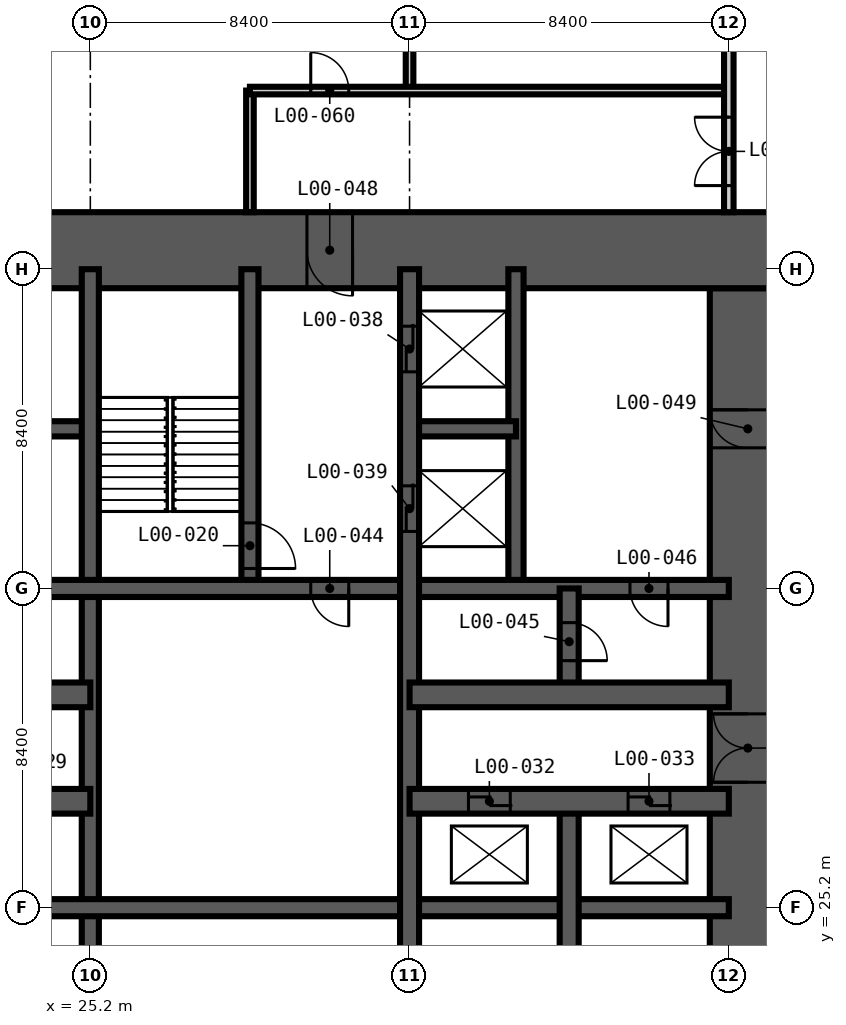
"""IFC4 building model, lengths in metres.
Left out: names, types, materials, properties, quantities, classifications, styles, units other than length and angle.
Written with IfcOpenShell. Run it as: python <this file> out.ifc"""

import sys

from ifc_helpers import new_model, si_unit, direction, frame, frame_2d, origin, place, context, subcontext, project, spatial, rectangle, extrude, element, fill, save


model = new_model("IFC4")
c1 = context("Model", 3, precision=1e-05, world=origin(), true_north=direction((0.0, 1.0)))
c2 = subcontext(c1, "Body", "Model", "MODEL_VIEW")
j1 = project(units=[si_unit("LENGTHUNIT", "METRE"), si_unit("PLANEANGLEUNIT", "RADIAN")], contexts=[c1])
p1 = place(None, origin())
s1 = spatial("IfcSite", under=j1, at=p1, CompositionType="ELEMENT")
p2 = place(p1, origin())
s2 = spatial("IfcBuilding", under=s1, at=p2, CompositionType="ELEMENT")
p3 = place(p2, origin())
s3 = spatial("IfcBuildingStorey", under=s2, at=p3, CompositionType="ELEMENT", Elevation=0.0)
p4 = place(p3, frame((42.5, 17.3, -0.3), z_axis=(0.0, 0.0, 1.0), x_axis=(0.0, 1.0, 0.0)))
e1 = element("IfcWall", 1, at=p4, inside=s3, PredefinedType="SHEAR", context=c2, shape_type="SweptSolid", body=[
    extrude(rectangle(XDim=24.2, YDim=2.0, at=frame_2d((12.1, 0.0))), origin(), (0.0, 0.0, 1.0), 6.0),
])
p5 = place(p4, frame((0.3, 0.0, 0.3)))
e2 = element("IfcOpeningElement", 2, at=p5, cuts=e1, PredefinedType="OPENING", context=c2, shape_type="SweptSolid", body=[
    extrude(rectangle(XDim=1.2, YDim=2.2, at=frame_2d((0.6, 1.1))), frame((0.0, 1.01, 0.0), z_axis=(0.0, -1.0, 0.0), x_axis=(1.0, 0.0, 0.0)), (0.0, 0.0, 1.0), 2.02),
])
p6 = place(p4, frame((11.2, 0.0, 0.3)))
e3 = element("IfcOpeningElement", 3, at=p6, cuts=e1, PredefinedType="OPENING", context=c2, shape_type="SweptSolid", body=[
    extrude(rectangle(XDim=1.8, YDim=2.2, at=frame_2d((0.9, 1.1))), frame((0.0, 1.01, 0.0), z_axis=(0.0, -1.0, 0.0), x_axis=(1.0, 0.0, 0.0)), (0.0, 0.0, 1.0), 2.02),
])
p7 = place(p4, frame((20.0, 0.0, 0.3)))
e4 = element("IfcOpeningElement", 4, at=p7, cuts=e1, PredefinedType="OPENING", context=c2, shape_type="SweptSolid", body=[
    extrude(rectangle(XDim=1.0, YDim=2.1, at=frame_2d((0.5, 1.05))), frame((0.0, 1.01, 0.0), z_axis=(0.0, -1.0, 0.0), x_axis=(1.0, 0.0, 0.0)), (0.0, 0.0, 1.0), 2.02),
])
p8 = place(p3, frame((43.5, 42.5, -0.3), z_axis=(0.0, 0.0, 1.0), x_axis=(-1.0, 0.0, 0.0)))
e5 = element("IfcWall", 5, at=p8, inside=s3, PredefinedType="SHEAR", context=c2, shape_type="SweptSolid", body=[
    extrude(rectangle(XDim=28.2, YDim=2.0, at=frame_2d((14.1, 0.0))), origin(), (0.0, 0.0, 1.0), 6.0),
])
p9 = place(p8, frame((22.0, 0.0, 0.3)))
e6 = element("IfcOpeningElement", 6, at=p9, cuts=e5, PredefinedType="OPENING", context=c2, shape_type="SweptSolid", body=[
    extrude(rectangle(XDim=1.0, YDim=2.1, at=frame_2d((0.5, 1.05))), frame((0.0, 1.01, 0.0), z_axis=(0.0, -1.0, 0.0), x_axis=(1.0, 0.0, 0.0)), (0.0, 0.0, 1.0), 2.02),
])
p10 = place(p8, frame((11.4, 0.0, 0.3)))
e7 = element("IfcOpeningElement", 7, at=p10, cuts=e5, PredefinedType="OPENING", context=c2, shape_type="SweptSolid", body=[
    extrude(rectangle(XDim=1.2, YDim=2.2, at=frame_2d((0.6, 1.1))), frame((0.0, 1.01, 0.0), z_axis=(0.0, -1.0, 0.0), x_axis=(1.0, 0.0, 0.0)), (0.0, 0.0, 1.0), 2.02),
])
for number, where, z_axis, x_axis in (
    (8, (36.4, 33.6, -0.3), (0.0, 0.0, 1.0), (0.0, 1.0, 0.0)),
    (9, (16.8, 37.8, -0.3), (0.0, 0.0, 1.0), (1.0, 0.0, 0.0)),
):
    element("IfcWall", number, at=place(p3, frame(where, z_axis=z_axis, x_axis=x_axis)), inside=s3, PredefinedType="SHEAR", context=c2, shape_type="SweptSolid", body=[
        extrude(rectangle(XDim=8.4, YDim=0.4, at=frame_2d((4.2, 0.0))), origin(), (0.0, 0.0, 1.0), 6.0),
    ])
p11 = place(p3, frame((33.6, 37.8, -0.3), z_axis=(0.0, 0.0, 1.0), x_axis=(1.0, 0.0, 0.0)))
e10 = element("IfcWall", 10, at=p11, inside=s3, PredefinedType="SHEAR", context=c2, shape_type="SweptSolid", body=[
    extrude(rectangle(XDim=2.8, YDim=0.4, at=frame_2d((1.4, 0.0))), origin(), (0.0, 0.0, 1.0), 6.0),
])
p12 = place(p3, frame((25.2, 16.8, -0.3), z_axis=(0.0, 0.0, 1.0), x_axis=(0.0, 1.0, 0.0)))
e11 = element("IfcWall", 11, at=p12, inside=s3, PredefinedType="SHEAR", context=c2, shape_type="SweptSolid", body=[
    extrude(rectangle(XDim=25.2, YDim=0.45, at=frame_2d((12.6, 0.0))), origin(), (0.0, 0.0, 1.0), 6.0),
])
p13 = place(p3, frame((29.4, 33.6, -0.3), z_axis=(0.0, 0.0, 1.0), x_axis=(0.0, 1.0, 0.0)))
e12 = element("IfcWall", 12, at=p13, inside=s3, PredefinedType="SHEAR", context=c2, shape_type="SweptSolid", body=[
    extrude(rectangle(XDim=8.4, YDim=0.45, at=frame_2d((4.2, 0.0))), origin(), (0.0, 0.0, 1.0), 6.0),
])
p14 = place(p13, frame((0.525, 0.0, 0.3)))
e13 = element("IfcOpeningElement", 13, at=p14, cuts=e12, PredefinedType="OPENING", context=c2, shape_type="SweptSolid", body=[
    extrude(rectangle(XDim=1.2, YDim=2.2, at=frame_2d((0.6, 1.1))), frame((0.0, 0.235, 0.0), z_axis=(0.0, -1.0, 0.0), x_axis=(1.0, 0.0, 0.0)), (0.0, 0.0, 1.0), 0.47),
])
p15 = place(p3, frame((16.8, 25.2, -0.3), z_axis=(0.0, 0.0, 1.0), x_axis=(1.0, 0.0, 0.0)))
e14 = element("IfcWall", 14, at=p15, inside=s3, PredefinedType="SHEAR", context=c2, shape_type="SweptSolid", body=[
    extrude(rectangle(XDim=25.2, YDim=0.45, at=frame_2d((12.6, 0.0))), origin(), (0.0, 0.0, 1.0), 6.0),
])
p16 = place(p3, frame((16.8, 33.6, -0.3), z_axis=(0.0, 0.0, 1.0), x_axis=(1.0, 0.0, 0.0)))
e15 = element("IfcWall", 15, at=p16, inside=s3, PredefinedType="SHEAR", context=c2, shape_type="SweptSolid", body=[
    extrude(rectangle(XDim=25.2, YDim=0.45, at=frame_2d((12.6, 0.0))), origin(), (0.0, 0.0, 1.0), 6.0),
])
p17 = place(p16, frame((14.2, 0.0, 0.3)))
e16 = element("IfcOpeningElement", 16, at=p17, cuts=e15, PredefinedType="OPENING", context=c2, shape_type="SweptSolid", body=[
    extrude(rectangle(XDim=1.0, YDim=2.1, at=frame_2d((0.5, 1.05))), frame((0.0, 0.235, 0.0), z_axis=(0.0, -1.0, 0.0), x_axis=(1.0, 0.0, 0.0)), (0.0, 0.0, 1.0), 0.47),
])
p18 = place(p16, frame((22.6, 0.0, 0.3)))
e17 = element("IfcOpeningElement", 17, at=p18, cuts=e15, PredefinedType="OPENING", context=c2, shape_type="SweptSolid", body=[
    extrude(rectangle(XDim=1.0, YDim=2.1, at=frame_2d((0.5, 1.05))), frame((0.0, 0.235, 0.0), z_axis=(0.0, -1.0, 0.0), x_axis=(1.0, 0.0, 0.0)), (0.0, 0.0, 1.0), 0.47),
])
p19 = place(p3, frame((33.6, 16.8, -0.3), z_axis=(0.0, 0.0, 1.0), x_axis=(0.0, 1.0, 0.0)))
e18 = element("IfcWall", 18, at=p19, inside=s3, PredefinedType="SHEAR", context=c2, shape_type="SweptSolid", body=[
    extrude(rectangle(XDim=25.2, YDim=0.5, at=frame_2d((12.6, 0.0))), origin(), (0.0, 0.0, 1.0), 6.0),
])
p20 = place(p19, frame((22.5, 0.0, 0.3)))
e19 = element("IfcOpeningElement", 19, at=p20, cuts=e18, PredefinedType="OPENING", context=c2, shape_type="SweptSolid", body=[
    extrude(rectangle(XDim=1.2, YDim=2.2, at=frame_2d((0.6, 1.1))), frame((0.0, 0.26, 0.0), z_axis=(0.0, -1.0, 0.0), x_axis=(1.0, 0.0, 0.0)), (0.0, 0.0, 1.0), 0.52),
])
p21 = place(p19, frame((18.3, 0.0, 0.3)))
e20 = element("IfcOpeningElement", 20, at=p21, cuts=e18, PredefinedType="OPENING", context=c2, shape_type="SweptSolid", body=[
    extrude(rectangle(XDim=1.2, YDim=2.2, at=frame_2d((0.6, 1.1))), frame((0.0, 0.26, 0.0), z_axis=(0.0, -1.0, 0.0), x_axis=(1.0, 0.0, 0.0)), (0.0, 0.0, 1.0), 0.52),
])
p22 = place(p3, frame((37.8, 16.8, -0.3), z_axis=(0.0, 0.0, 1.0), x_axis=(0.0, 1.0, 0.0)))
e21 = element("IfcWall", 21, at=p22, inside=s3, PredefinedType="SHEAR", context=c2, shape_type="SweptSolid", body=[
    extrude(rectangle(XDim=11.2, YDim=0.5, at=frame_2d((5.6, 0.0))), origin(), (0.0, 0.0, 1.0), 6.0),
])
p23 = place(p3, frame((37.8, 30.8, -0.3), z_axis=(0.0, 0.0, 1.0), x_axis=(0.0, 1.0, 0.0)))
e22 = element("IfcWall", 22, at=p23, inside=s3, PredefinedType="SHEAR", context=c2, shape_type="SweptSolid", body=[
    extrude(rectangle(XDim=2.8, YDim=0.5, at=frame_2d((1.4, 0.0))), origin(), (0.0, 0.0, 1.0), 6.0),
])
p24 = place(p23, frame((0.9, 0.0, 0.3)))
e23 = element("IfcOpeningElement", 23, at=p24, cuts=e22, PredefinedType="OPENING", context=c2, shape_type="SweptSolid", body=[
    extrude(rectangle(XDim=1.0, YDim=2.1, at=frame_2d((0.5, 1.05))), frame((0.0, 0.26, 0.0), z_axis=(0.0, -1.0, 0.0), x_axis=(1.0, 0.0, 0.0)), (0.0, 0.0, 1.0), 0.52),
])
p25 = place(p3, frame((16.8, 28.0, -0.3), z_axis=(0.0, 0.0, 1.0), x_axis=(1.0, 0.0, 0.0)))
e24 = element("IfcWall", 24, at=p25, inside=s3, PredefinedType="SHEAR", context=c2, shape_type="SweptSolid", body=[
    extrude(rectangle(XDim=8.4, YDim=0.65, at=frame_2d((4.2, 0.0))), origin(), (0.0, 0.0, 1.0), 6.0),
])
p26 = place(p25, frame((1.55, 0.0, 0.3)))
e25 = element("IfcOpeningElement", 25, at=p26, cuts=e24, PredefinedType="OPENING", context=c2, shape_type="SweptSolid", body=[
    extrude(rectangle(XDim=1.1, YDim=2.2, at=frame_2d((0.55, 1.1))), frame((0.0, 0.335, 0.0), z_axis=(0.0, -1.0, 0.0), x_axis=(1.0, 0.0, 0.0)), (0.0, 0.0, 1.0), 0.67),
])
p27 = place(p25, frame((5.75, 0.0, 0.3)))
e26 = element("IfcOpeningElement", 26, at=p27, cuts=e24, PredefinedType="OPENING", context=c2, shape_type="SweptSolid", body=[
    extrude(rectangle(XDim=1.1, YDim=2.2, at=frame_2d((0.55, 1.1))), frame((0.0, 0.335, 0.0), z_axis=(0.0, -1.0, 0.0), x_axis=(1.0, 0.0, 0.0)), (0.0, 0.0, 1.0), 0.67),
])
p28 = place(p3, frame((33.6, 28.0, -0.3), z_axis=(0.0, 0.0, 1.0), x_axis=(1.0, 0.0, 0.0)))
e27 = element("IfcWall", 27, at=p28, inside=s3, PredefinedType="SHEAR", context=c2, shape_type="SweptSolid", body=[
    extrude(rectangle(XDim=8.4, YDim=0.65, at=frame_2d((4.2, 0.0))), origin(), (0.0, 0.0, 1.0), 6.0),
])
p29 = place(p28, frame((1.55, 0.0, 0.3)))
e28 = element("IfcOpeningElement", 28, at=p29, cuts=e27, PredefinedType="OPENING", context=c2, shape_type="SweptSolid", body=[
    extrude(rectangle(XDim=1.1, YDim=2.2, at=frame_2d((0.55, 1.1))), frame((0.0, 0.335, 0.0), z_axis=(0.0, -1.0, 0.0), x_axis=(1.0, 0.0, 0.0)), (0.0, 0.0, 1.0), 0.67),
])
p30 = place(p28, frame((5.75, 0.0, 0.3)))
e29 = element("IfcOpeningElement", 29, at=p30, cuts=e27, PredefinedType="OPENING", context=c2, shape_type="SweptSolid", body=[
    extrude(rectangle(XDim=1.1, YDim=2.2, at=frame_2d((0.55, 1.1))), frame((0.0, 0.335, 0.0), z_axis=(0.0, -1.0, 0.0), x_axis=(1.0, 0.0, 0.0)), (0.0, 0.0, 1.0), 0.67),
])
p31 = place(p3, frame((16.8, 30.8, -0.3), z_axis=(0.0, 0.0, 1.0), x_axis=(1.0, 0.0, 0.0)))
e30 = element("IfcWall", 30, at=p31, inside=s3, PredefinedType="SHEAR", context=c2, shape_type="SweptSolid", body=[
    extrude(rectangle(XDim=8.4, YDim=0.65, at=frame_2d((4.2, 0.0))), origin(), (0.0, 0.0, 1.0), 6.0),
])
p32 = place(p31, frame((1.55, 0.0, 0.3)))
e31 = element("IfcOpeningElement", 31, at=p32, cuts=e30, PredefinedType="OPENING", context=c2, shape_type="SweptSolid", body=[
    extrude(rectangle(XDim=1.1, YDim=2.2, at=frame_2d((0.55, 1.1))), frame((0.0, 0.335, 0.0), z_axis=(0.0, -1.0, 0.0), x_axis=(1.0, 0.0, 0.0)), (0.0, 0.0, 1.0), 0.67),
])
p33 = place(p31, frame((5.75, 0.0, 0.3)))
e32 = element("IfcOpeningElement", 32, at=p33, cuts=e30, PredefinedType="OPENING", context=c2, shape_type="SweptSolid", body=[
    extrude(rectangle(XDim=1.1, YDim=2.2, at=frame_2d((0.55, 1.1))), frame((0.0, 0.335, 0.0), z_axis=(0.0, -1.0, 0.0), x_axis=(1.0, 0.0, 0.0)), (0.0, 0.0, 1.0), 0.67),
])
p34 = place(p3, frame((33.6, 30.8, -0.3), z_axis=(0.0, 0.0, 1.0), x_axis=(1.0, 0.0, 0.0)))
e33 = element("IfcWall", 33, at=p34, inside=s3, PredefinedType="SHEAR", context=c2, shape_type="SweptSolid", body=[
    extrude(rectangle(XDim=8.4, YDim=0.65, at=frame_2d((4.2, 0.0))), origin(), (0.0, 0.0, 1.0), 6.0),
])
p35 = place(p3, frame((29.4, 43.5, 0.0), z_axis=(0.0, 0.0, 1.0), x_axis=(0.0, 1.0, 0.0)))
e34 = element("IfcWall", 34, at=p35, inside=s3, PredefinedType="PARTITIONING", context=c2, shape_type="SweptSolid", body=[
    extrude(rectangle(XDim=3.2, YDim=0.2, at=frame_2d((1.6, 0.0))), origin(), (0.0, 0.0, 1.0), 5.7),
])
p36 = place(p3, frame((33.6, 46.7, 0.0), z_axis=(0.0, 0.0, 1.0), x_axis=(0.0, 1.0, 0.0)))
e35 = element("IfcWall", 35, at=p36, inside=s3, PredefinedType="PARTITIONING", context=c2, shape_type="SweptSolid", body=[
    extrude(rectangle(XDim=12.1, YDim=0.2, at=frame_2d((6.05, 0.0))), origin(), (0.0, 0.0, 1.0), 5.7),
])
p37 = place(p3, frame((29.4, 46.7, 0.0), z_axis=(0.0, 0.0, 1.0), x_axis=(1.0, 0.0, 0.0)))
e36 = element("IfcWall", 36, at=p37, inside=s3, PredefinedType="PARTITIONING", context=c2, shape_type="SweptSolid", body=[
    extrude(rectangle(XDim=12.6, YDim=0.2, at=frame_2d((6.3, 0.0))), origin(), (0.0, 0.0, 1.0), 5.7),
])
p38 = place(p37, frame((1.6, 0.0, 0.0)))
e37 = element("IfcOpeningElement", 37, at=p38, cuts=e36, PredefinedType="OPENING", context=c2, shape_type="SweptSolid", body=[
    extrude(rectangle(XDim=1.0, YDim=2.1, at=frame_2d((0.5, 1.05))), frame((0.0, 0.11, 0.0), z_axis=(0.0, -1.0, 0.0), x_axis=(1.0, 0.0, 0.0)), (0.0, 0.0, 1.0), 0.22),
])
p39 = place(p3, frame((42.0, 43.5, 0.0), z_axis=(0.0, 0.0, 1.0), x_axis=(0.0, 1.0, 0.0)))
e38 = element("IfcWall", 38, at=p39, inside=s3, PredefinedType="PARTITIONING", context=c2, shape_type="SweptSolid", body=[
    extrude(rectangle(XDim=15.3, YDim=0.25, at=frame_2d((7.65, 0.0))), origin(), (0.0, 0.0, 1.0), 5.7),
])
p40 = place(p39, frame((0.7, 0.0, 0.0)))
e39 = element("IfcOpeningElement", 39, at=p40, cuts=e38, PredefinedType="OPENING", context=c2, shape_type="SweptSolid", body=[
    extrude(rectangle(XDim=1.8, YDim=2.4, at=frame_2d((0.9, 1.2))), frame((0.0, 0.135, 0.0), z_axis=(0.0, -1.0, 0.0), x_axis=(1.0, 0.0, 0.0)), (0.0, 0.0, 1.0), 0.27),
])
p41 = place(p39, frame((8.35, 0.0, 0.0)))
e40 = element("IfcOpeningElement", 40, at=p41, cuts=e38, PredefinedType="OPENING", context=c2, shape_type="SweptSolid", body=[
    extrude(rectangle(XDim=1.0, YDim=2.1, at=frame_2d((0.5, 1.05))), frame((0.0, 0.135, 0.0), z_axis=(0.0, -1.0, 0.0), x_axis=(1.0, 0.0, 0.0)), (0.0, 0.0, 1.0), 0.27),
])
p42 = place(p14, frame((1.2, 0.0, 0.0), z_axis=(0.0, 0.0, 1.0), x_axis=(-1.0, 0.0, 0.0)))
e41 = element("IfcDoor", 41, at=p42, inside=s3, OperationType="SINGLE_SWING_RIGHT", PredefinedType="DOOR", context=c2, shape_type="SweptSolid", body=[
    extrude(rectangle(XDim=1.2, YDim=2.2, at=frame_2d((0.6, 1.1))), frame((0.0, 0.025, 0.0), z_axis=(0.0, -1.0, 0.0), x_axis=(1.0, 0.0, 0.0)), (0.0, 0.0, 1.0), 0.05),
])
fill(e13, e41)
p43 = place(p29, origin())
e42 = element("IfcDoor", 42, at=p43, inside=s3, OperationType="DOUBLE_DOOR_SLIDING", PredefinedType="DOOR", context=c2, shape_type="SweptSolid", body=[
    extrude(rectangle(XDim=1.1, YDim=2.2, at=frame_2d((0.55, 1.1))), frame((0.0, 0.025, 0.0), z_axis=(0.0, -1.0, 0.0), x_axis=(1.0, 0.0, 0.0)), (0.0, 0.0, 1.0), 0.05),
])
fill(e28, e42)
p44 = place(p30, origin())
e43 = element("IfcDoor", 43, at=p44, inside=s3, OperationType="DOUBLE_DOOR_SLIDING", PredefinedType="DOOR", context=c2, shape_type="SweptSolid", body=[
    extrude(rectangle(XDim=1.1, YDim=2.2, at=frame_2d((0.55, 1.1))), frame((0.0, 0.025, 0.0), z_axis=(0.0, -1.0, 0.0), x_axis=(1.0, 0.0, 0.0)), (0.0, 0.0, 1.0), 0.05),
])
fill(e29, e43)
p45 = place(p20, origin())
e44 = element("IfcDoor", 44, at=p45, inside=s3, OperationType="DOUBLE_DOOR_SLIDING", PredefinedType="DOOR", context=c2, shape_type="SweptSolid", body=[
    extrude(rectangle(XDim=1.2, YDim=2.2, at=frame_2d((0.6, 1.1))), frame((0.0, 0.025, 0.0), z_axis=(0.0, -1.0, 0.0), x_axis=(1.0, 0.0, 0.0)), (0.0, 0.0, 1.0), 0.05),
])
fill(e19, e44)
p46 = place(p21, origin())
e45 = element("IfcDoor", 45, at=p46, inside=s3, OperationType="DOUBLE_DOOR_SLIDING", PredefinedType="DOOR", context=c2, shape_type="SweptSolid", body=[
    extrude(rectangle(XDim=1.2, YDim=2.2, at=frame_2d((0.6, 1.1))), frame((0.0, 0.025, 0.0), z_axis=(0.0, -1.0, 0.0), x_axis=(1.0, 0.0, 0.0)), (0.0, 0.0, 1.0), 0.05),
])
fill(e20, e45)
p47 = place(p17, frame((1.0, 0.0, 0.0), z_axis=(0.0, 0.0, 1.0), x_axis=(-1.0, 0.0, 0.0)))
e46 = element("IfcDoor", 46, at=p47, inside=s3, OperationType="SINGLE_SWING_LEFT", PredefinedType="DOOR", context=c2, shape_type="SweptSolid", body=[
    extrude(rectangle(XDim=1.0, YDim=2.1, at=frame_2d((0.5, 1.05))), frame((0.0, 0.025, 0.0), z_axis=(0.0, -1.0, 0.0), x_axis=(1.0, 0.0, 0.0)), (0.0, 0.0, 1.0), 0.05),
])
fill(e16, e46)
p48 = place(p24, frame((1.0, 0.0, 0.0), z_axis=(0.0, 0.0, 1.0), x_axis=(-1.0, 0.0, 0.0)))
e47 = element("IfcDoor", 47, at=p48, inside=s3, OperationType="SINGLE_SWING_RIGHT", PredefinedType="DOOR", context=c2, shape_type="SweptSolid", body=[
    extrude(rectangle(XDim=1.0, YDim=2.1, at=frame_2d((0.5, 1.05))), frame((0.0, 0.025, 0.0), z_axis=(0.0, -1.0, 0.0), x_axis=(1.0, 0.0, 0.0)), (0.0, 0.0, 1.0), 0.05),
])
fill(e23, e47)
p49 = place(p18, frame((1.0, 0.0, 0.0), z_axis=(0.0, 0.0, 1.0), x_axis=(-1.0, 0.0, 0.0)))
e48 = element("IfcDoor", 48, at=p49, inside=s3, OperationType="SINGLE_SWING_LEFT", PredefinedType="DOOR", context=c2, shape_type="SweptSolid", body=[
    extrude(rectangle(XDim=1.0, YDim=2.1, at=frame_2d((0.5, 1.05))), frame((0.0, 0.025, 0.0), z_axis=(0.0, -1.0, 0.0), x_axis=(1.0, 0.0, 0.0)), (0.0, 0.0, 1.0), 0.05),
])
fill(e17, e48)
p50 = place(p6, origin())
e49 = element("IfcDoor", 49, at=p50, inside=s3, OperationType="DOUBLE_DOOR_DOUBLE_SWING", PredefinedType="DOOR", context=c2, shape_type="SweptSolid", body=[
    extrude(rectangle(XDim=1.8, YDim=2.2, at=frame_2d((0.9, 1.1))), frame((0.0, 0.025, 0.0), z_axis=(0.0, -1.0, 0.0), x_axis=(1.0, 0.0, 0.0)), (0.0, 0.0, 1.0), 0.05),
])
fill(e3, e49)
p51 = place(p10, origin())
e50 = element("IfcDoor", 50, at=p51, inside=s3, OperationType="SINGLE_SWING_LEFT", PredefinedType="DOOR", context=c2, shape_type="SweptSolid", body=[
    extrude(rectangle(XDim=1.2, YDim=2.2, at=frame_2d((0.6, 1.1))), frame((0.0, 0.025, 0.0), z_axis=(0.0, -1.0, 0.0), x_axis=(1.0, 0.0, 0.0)), (0.0, 0.0, 1.0), 0.05),
])
fill(e7, e50)
p52 = place(p7, origin())
e51 = element("IfcDoor", 51, at=p52, inside=s3, OperationType="SINGLE_SWING_RIGHT", PredefinedType="DOOR", context=c2, shape_type="SweptSolid", body=[
    extrude(rectangle(XDim=1.0, YDim=2.1, at=frame_2d((0.5, 1.05))), frame((0.0, 0.025, 0.0), z_axis=(0.0, -1.0, 0.0), x_axis=(1.0, 0.0, 0.0)), (0.0, 0.0, 1.0), 0.05),
])
fill(e4, e51)
p53 = place(p40, origin())
e52 = element("IfcDoor", 52, at=p53, inside=s3, OperationType="DOUBLE_DOOR_DOUBLE_SWING", PredefinedType="DOOR", context=c2, shape_type="SweptSolid", body=[
    extrude(rectangle(XDim=1.8, YDim=2.4, at=frame_2d((0.9, 1.2))), frame((0.0, 0.025, 0.0), z_axis=(0.0, -1.0, 0.0), x_axis=(1.0, 0.0, 0.0)), (0.0, 0.0, 1.0), 0.05),
])
fill(e39, e52)
p54 = place(p38, origin())
e53 = element("IfcDoor", 53, at=p54, inside=s3, OperationType="SINGLE_SWING_LEFT", PredefinedType="DOOR", context=c2, shape_type="SweptSolid", body=[
    extrude(rectangle(XDim=1.0, YDim=2.1, at=frame_2d((0.5, 1.05))), frame((0.0, 0.025, 0.0), z_axis=(0.0, -1.0, 0.0), x_axis=(1.0, 0.0, 0.0)), (0.0, 0.0, 1.0), 0.05),
])
fill(e37, e53)
save(model, sys.argv[1])
